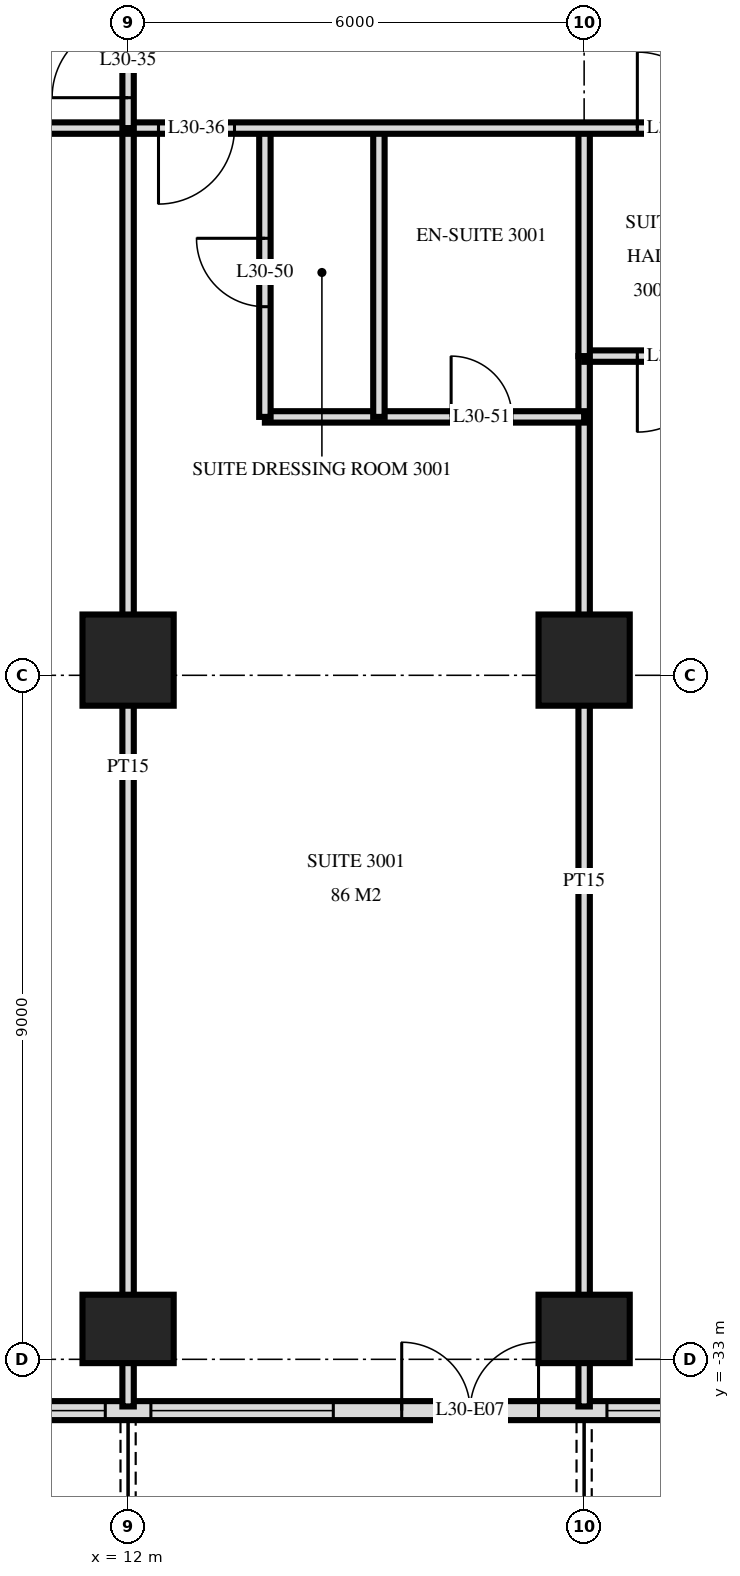
"""IFC4 building model, lengths in metres.
Left out: names, types, materials, properties, quantities, classifications, styles, units other than length and angle.
Written with IfcOpenShell. Run it as: python <this file> out.ifc"""

import sys

from ifc_helpers import new_model, si_unit, direction, frame, frame_2d, origin, origin_2d, place, context, subcontext, project, spatial, rectangle, extrude, element, fill, save


model = new_model("IFC4")
c1 = context("Model", 3, precision=1e-05, world=origin(), true_north=direction((0.0, 1.0)))
c2 = subcontext(c1, "Body", "Model", "MODEL_VIEW")
j1 = project(units=[si_unit("LENGTHUNIT", "METRE"), si_unit("PLANEANGLEUNIT", "RADIAN")], contexts=[c1])
p1 = place(None, origin())
s1 = spatial("IfcSite", under=j1, at=p1, CompositionType="ELEMENT")
p2 = place(p1, origin())
s2 = spatial("IfcBuilding", under=s1, at=p2, CompositionType="ELEMENT")
p3 = place(p2, frame((0.0, 0.0, 120.0)))
s3 = spatial("IfcBuildingStorey", under=s2, at=p3, CompositionType="ELEMENT", Elevation=120.0)
p4 = place(p3, frame((12.0, -32.6, 0.0), z_axis=(0.0, 0.0, 1.0), x_axis=(1.0, 0.0, 0.0)))
e1 = element("IfcColumn", 1, at=p4, inside=s3, PredefinedType="COLUMN", context=c2, shape_type="SweptSolid", body=[
    extrude(rectangle(XDim=1.2, YDim=0.9, at=origin_2d()), origin(), (0.0, 0.0, 1.0), 3.6),
])
p5 = place(p3, frame((12.0, -23.8, 0.0), z_axis=(0.0, 0.0, 1.0), x_axis=(1.0, 0.0, 0.0)))
e2 = element("IfcColumn", 2, at=p5, inside=s3, PredefinedType="COLUMN", context=c2, shape_type="SweptSolid", body=[
    extrude(rectangle(XDim=1.2, YDim=1.2, at=origin_2d()), origin(), (0.0, 0.0, 1.0), 3.6),
])
p6 = place(p3, frame((18.0, -32.6, 0.0), z_axis=(0.0, 0.0, 1.0), x_axis=(1.0, 0.0, 0.0)))
e3 = element("IfcColumn", 3, at=p6, inside=s3, PredefinedType="COLUMN", context=c2, shape_type="SweptSolid", body=[
    extrude(rectangle(XDim=1.2, YDim=0.9, at=origin_2d()), origin(), (0.0, 0.0, 1.0), 3.6),
])
p7 = place(p3, frame((18.0, -23.8, 0.0), z_axis=(0.0, 0.0, 1.0), x_axis=(1.0, 0.0, 0.0)))
e4 = element("IfcColumn", 4, at=p7, inside=s3, PredefinedType="COLUMN", context=c2, shape_type="SweptSolid", body=[
    extrude(rectangle(XDim=1.2, YDim=1.2, at=origin_2d()), origin(), (0.0, 0.0, 1.0), 3.6),
])
p8 = place(p3, frame((-23.675, -33.675, 0.0), z_axis=(0.0, 0.0, 1.0), x_axis=(1.0, 0.0, 0.0)))
e5 = element("IfcWall", 5, at=p8, inside=s3, PredefinedType="SOLIDWALL", context=c2, shape_type="SweptSolid", body=[
    extrude(rectangle(XDim=47.351, YDim=0.25, at=frame_2d((23.675, 0.0))), origin(), (0.0, 0.0, 1.0), 3.32),
])
p9 = place(p8, frame((0.275, 0.0, 0.3)))
e6 = element("IfcOpeningElement", 6, at=p9, cuts=e5, PredefinedType="OPENING", context=c2, shape_type="SweptSolid", body=[
    extrude(rectangle(XDim=2.4, YDim=2.1, at=frame_2d((1.2, 1.05))), frame((0.0, 0.135, 0.0), z_axis=(0.0, -1.0, 0.0), x_axis=(1.0, 0.0, 0.0)), (0.0, 0.0, 1.0), 0.27),
])
p10 = place(p8, frame((3.425, 0.0, 0.0)))
e7 = element("IfcOpeningElement", 7, at=p10, cuts=e5, PredefinedType="OPENING", context=c2, shape_type="SweptSolid", body=[
    extrude(rectangle(XDim=1.8, YDim=2.4, at=frame_2d((0.9, 1.2))), frame((0.0, 0.135, 0.0), z_axis=(0.0, -1.0, 0.0), x_axis=(1.0, 0.0, 0.0)), (0.0, 0.0, 1.0), 0.27),
])
p11 = place(p8, frame((7.775, 0.0, 0.0)))
e8 = element("IfcOpeningElement", 8, at=p11, cuts=e5, PredefinedType="OPENING", context=c2, shape_type="SweptSolid", body=[
    extrude(rectangle(XDim=1.8, YDim=2.4, at=frame_2d((0.9, 1.2))), frame((0.0, 0.135, 0.0), z_axis=(0.0, -1.0, 0.0), x_axis=(1.0, 0.0, 0.0)), (0.0, 0.0, 1.0), 0.27),
])
p12 = place(p8, frame((12.275, 0.0, 0.0)))
e9 = element("IfcOpeningElement", 9, at=p12, cuts=e5, PredefinedType="OPENING", context=c2, shape_type="SweptSolid", body=[
    extrude(rectangle(XDim=1.8, YDim=2.4, at=frame_2d((0.9, 1.2))), frame((0.0, 0.135, 0.0), z_axis=(0.0, -1.0, 0.0), x_axis=(1.0, 0.0, 0.0)), (0.0, 0.0, 1.0), 0.27),
])
p13 = place(p8, frame((14.975, 0.0, 0.3)))
e10 = element("IfcOpeningElement", 10, at=p13, cuts=e5, PredefinedType="OPENING", context=c2, shape_type="SweptSolid", body=[
    extrude(rectangle(XDim=2.4, YDim=2.1, at=frame_2d((1.2, 1.05))), frame((0.0, 0.135, 0.0), z_axis=(0.0, -1.0, 0.0), x_axis=(1.0, 0.0, 0.0)), (0.0, 0.0, 1.0), 0.27),
])
p14 = place(p8, frame((17.975, 0.0, 0.3)))
e11 = element("IfcOpeningElement", 11, at=p14, cuts=e5, PredefinedType="OPENING", context=c2, shape_type="SweptSolid", body=[
    extrude(rectangle(XDim=2.4, YDim=2.1, at=frame_2d((1.2, 1.05))), frame((0.0, 0.135, 0.0), z_axis=(0.0, -1.0, 0.0), x_axis=(1.0, 0.0, 0.0)), (0.0, 0.0, 1.0), 0.27),
])
p15 = place(p8, frame((21.275, 0.0, 0.0)))
e12 = element("IfcOpeningElement", 12, at=p15, cuts=e5, PredefinedType="OPENING", context=c2, shape_type="SweptSolid", body=[
    extrude(rectangle(XDim=1.8, YDim=2.4, at=frame_2d((0.9, 1.2))), frame((0.0, 0.135, 0.0), z_axis=(0.0, -1.0, 0.0), x_axis=(1.0, 0.0, 0.0)), (0.0, 0.0, 1.0), 0.27),
])
p16 = place(p8, frame((24.275, 0.0, 0.0)))
e13 = element("IfcOpeningElement", 13, at=p16, cuts=e5, PredefinedType="OPENING", context=c2, shape_type="SweptSolid", body=[
    extrude(rectangle(XDim=1.8, YDim=2.4, at=frame_2d((0.9, 1.2))), frame((0.0, 0.135, 0.0), z_axis=(0.0, -1.0, 0.0), x_axis=(1.0, 0.0, 0.0)), (0.0, 0.0, 1.0), 0.27),
])
p17 = place(p8, frame((26.975, 0.0, 0.3)))
e14 = element("IfcOpeningElement", 14, at=p17, cuts=e5, PredefinedType="OPENING", context=c2, shape_type="SweptSolid", body=[
    extrude(rectangle(XDim=2.4, YDim=2.1, at=frame_2d((1.2, 1.05))), frame((0.0, 0.135, 0.0), z_axis=(0.0, -1.0, 0.0), x_axis=(1.0, 0.0, 0.0)), (0.0, 0.0, 1.0), 0.27),
])
p18 = place(p8, frame((30.275, 0.0, 0.0)))
e15 = element("IfcOpeningElement", 15, at=p18, cuts=e5, PredefinedType="OPENING", context=c2, shape_type="SweptSolid", body=[
    extrude(rectangle(XDim=1.8, YDim=2.4, at=frame_2d((0.9, 1.2))), frame((0.0, 0.135, 0.0), z_axis=(0.0, -1.0, 0.0), x_axis=(1.0, 0.0, 0.0)), (0.0, 0.0, 1.0), 0.27),
])
p19 = place(p8, frame((32.975, 0.0, 0.3)))
e16 = element("IfcOpeningElement", 16, at=p19, cuts=e5, PredefinedType="OPENING", context=c2, shape_type="SweptSolid", body=[
    extrude(rectangle(XDim=2.4, YDim=2.1, at=frame_2d((1.2, 1.05))), frame((0.0, 0.135, 0.0), z_axis=(0.0, -1.0, 0.0), x_axis=(1.0, 0.0, 0.0)), (0.0, 0.0, 1.0), 0.27),
])
p20 = place(p8, frame((35.975, 0.0, 0.3)))
e17 = element("IfcOpeningElement", 17, at=p20, cuts=e5, PredefinedType="OPENING", context=c2, shape_type="SweptSolid", body=[
    extrude(rectangle(XDim=2.4, YDim=2.1, at=frame_2d((1.2, 1.05))), frame((0.0, 0.135, 0.0), z_axis=(0.0, -1.0, 0.0), x_axis=(1.0, 0.0, 0.0)), (0.0, 0.0, 1.0), 0.27),
])
p21 = place(p8, frame((39.275, 0.0, 0.0)))
e18 = element("IfcOpeningElement", 18, at=p21, cuts=e5, PredefinedType="OPENING", context=c2, shape_type="SweptSolid", body=[
    extrude(rectangle(XDim=1.8, YDim=2.4, at=frame_2d((0.9, 1.2))), frame((0.0, 0.135, 0.0), z_axis=(0.0, -1.0, 0.0), x_axis=(1.0, 0.0, 0.0)), (0.0, 0.0, 1.0), 0.27),
])
p22 = place(p8, frame((41.975, 0.0, 0.3)))
e19 = element("IfcOpeningElement", 19, at=p22, cuts=e5, PredefinedType="OPENING", context=c2, shape_type="SweptSolid", body=[
    extrude(rectangle(XDim=2.4, YDim=2.1, at=frame_2d((1.2, 1.05))), frame((0.0, 0.135, 0.0), z_axis=(0.0, -1.0, 0.0), x_axis=(1.0, 0.0, 0.0)), (0.0, 0.0, 1.0), 0.27),
])
p23 = place(p8, frame((45.125, 0.0, 0.0)))
e20 = element("IfcOpeningElement", 20, at=p23, cuts=e5, PredefinedType="OPENING", context=c2, shape_type="SweptSolid", body=[
    extrude(rectangle(XDim=1.8, YDim=2.4, at=frame_2d((0.9, 1.2))), frame((0.0, 0.135, 0.0), z_axis=(0.0, -1.0, 0.0), x_axis=(1.0, 0.0, 0.0)), (0.0, 0.0, 1.0), 0.27),
])
p24 = place(p3, frame((18.0, -19.8, 0.0), z_axis=(0.0, 0.0, 1.0), x_axis=(0.0, 1.0, 0.0)))
e21 = element("IfcWall", 21, at=p24, inside=s3, PredefinedType="PARTITIONING", context=c2, shape_type="SweptSolid", body=[
    extrude(rectangle(XDim=3.0, YDim=0.15, at=frame_2d((1.5, 0.0))), origin(), (0.0, 0.0, 1.0), 3.32),
])
p25 = place(p3, frame((18.0, -33.62, 0.0), z_axis=(0.0, 0.0, 1.0), x_axis=(0.0, 1.0, 0.0)))
e22 = element("IfcWall", 22, at=p25, inside=s3, PredefinedType="PARTITIONING", context=c2, shape_type="SweptSolid", body=[
    extrude(rectangle(XDim=13.82, YDim=0.15, at=frame_2d((6.91, 0.0))), origin(), (0.0, 0.0, 1.0), 3.32),
])
p26 = place(p3, frame((15.3, -20.6, 0.0), z_axis=(0.0, 0.0, 1.0), x_axis=(0.0, 1.0, 0.0)))
e23 = element("IfcWall", 23, at=p26, inside=s3, PredefinedType="PARTITIONING", context=c2, shape_type="SweptSolid", body=[
    extrude(rectangle(XDim=3.8, YDim=0.15, at=frame_2d((1.9, 0.0))), origin(), (0.0, 0.0, 1.0), 3.32),
])
p27 = place(p3, frame((13.8, -20.6, 0.0), z_axis=(0.0, 0.0, 1.0), x_axis=(0.0, 1.0, 0.0)))
e24 = element("IfcWall", 24, at=p27, inside=s3, PredefinedType="PARTITIONING", context=c2, shape_type="SweptSolid", body=[
    extrude(rectangle(XDim=3.8, YDim=0.15, at=frame_2d((1.9, 0.0))), origin(), (0.0, 0.0, 1.0), 3.32),
])
p28 = place(p27, frame((1.45, 0.0, 0.0)))
e25 = element("IfcOpeningElement", 25, at=p28, cuts=e24, PredefinedType="OPENING", context=c2, shape_type="SweptSolid", body=[
    extrude(rectangle(XDim=0.9, YDim=2.1, at=frame_2d((0.45, 1.05))), frame((0.0, 0.085, 0.0), z_axis=(0.0, -1.0, 0.0), x_axis=(1.0, 0.0, 0.0)), (0.0, 0.0, 1.0), 0.17),
])
p29 = place(p3, frame((12.0, -16.8, 0.0), z_axis=(0.0, 0.0, 1.0), x_axis=(0.0, 1.0, 0.0)))
e26 = element("IfcWall", 26, at=p29, inside=s3, PredefinedType="PARTITIONING", context=c2, shape_type="SweptSolid", body=[
    extrude(rectangle(XDim=1.75, YDim=0.15, at=frame_2d((0.875, 0.0))), origin(), (0.0, 0.0, 1.0), 3.32),
])
p30 = place(p29, frame((0.4, 0.0, 0.0)))
e27 = element("IfcOpeningElement", 27, at=p30, cuts=e26, PredefinedType="OPENING", context=c2, shape_type="SweptSolid", body=[
    extrude(rectangle(XDim=1.0, YDim=2.1, at=frame_2d((0.5, 1.05))), frame((0.0, 0.085, 0.0), z_axis=(0.0, -1.0, 0.0), x_axis=(1.0, 0.0, 0.0)), (0.0, 0.0, 1.0), 0.17),
])
p31 = place(p3, frame((12.0, -33.62, 0.0), z_axis=(0.0, 0.0, 1.0), x_axis=(0.0, 1.0, 0.0)))
e28 = element("IfcWall", 28, at=p31, inside=s3, PredefinedType="PARTITIONING", context=c2, shape_type="SweptSolid", body=[
    extrude(rectangle(XDim=16.82, YDim=0.15, at=frame_2d((8.41, 0.0))), origin(), (0.0, 0.0, 1.0), 3.32),
])
p32 = place(p3, frame((13.8, -20.6, 0.0), z_axis=(0.0, 0.0, 1.0), x_axis=(1.0, 0.0, 0.0)))
e29 = element("IfcWall", 29, at=p32, inside=s3, PredefinedType="PARTITIONING", context=c2, shape_type="SweptSolid", body=[
    extrude(rectangle(XDim=4.2, YDim=0.15, at=frame_2d((2.1, 0.0))), origin(), (0.0, 0.0, 1.0), 3.32),
])
p33 = place(p32, frame((2.45, 0.0, 0.0)))
e30 = element("IfcOpeningElement", 30, at=p33, cuts=e29, PredefinedType="OPENING", context=c2, shape_type="SweptSolid", body=[
    extrude(rectangle(XDim=0.8, YDim=2.1, at=frame_2d((0.4, 1.05))), frame((0.0, 0.085, 0.0), z_axis=(0.0, -1.0, 0.0), x_axis=(1.0, 0.0, 0.0)), (0.0, 0.0, 1.0), 0.17),
])
p34 = place(p3, frame((18.0, -19.8, 0.0), z_axis=(0.0, 0.0, 1.0), x_axis=(1.0, 0.0, 0.0)))
e31 = element("IfcWall", 31, at=p34, inside=s3, PredefinedType="PARTITIONING", context=c2, shape_type="SweptSolid", body=[
    extrude(rectangle(XDim=2.4, YDim=0.15, at=frame_2d((1.2, 0.0))), origin(), (0.0, 0.0, 1.0), 3.32),
])
p35 = place(p34, frame((0.7, 0.0, 0.0)))
e32 = element("IfcOpeningElement", 32, at=p35, cuts=e31, PredefinedType="OPENING", context=c2, shape_type="SweptSolid", body=[
    extrude(rectangle(XDim=1.0, YDim=2.1, at=frame_2d((0.5, 1.05))), frame((0.0, 0.085, 0.0), z_axis=(0.0, -1.0, 0.0), x_axis=(1.0, 0.0, 0.0)), (0.0, 0.0, 1.0), 0.17),
])
p36 = place(p3, frame((-28.02, -16.8, 0.0), z_axis=(0.0, 0.0, 1.0), x_axis=(1.0, 0.0, 0.0)))
e33 = element("IfcWall", 33, at=p36, inside=s3, PredefinedType="PARTITIONING", context=c2, shape_type="SweptSolid", body=[
    extrude(rectangle(XDim=56.04, YDim=0.15, at=frame_2d((28.02, 0.0))), origin(), (0.0, 0.0, 1.0), 3.32),
])
p37 = place(p36, frame((12.52, 0.0, 0.0)))
e34 = element("IfcOpeningElement", 34, at=p37, cuts=e33, PredefinedType="OPENING", context=c2, shape_type="SweptSolid", body=[
    extrude(rectangle(XDim=1.0, YDim=2.1, at=frame_2d((0.5, 1.05))), frame((0.0, 0.085, 0.0), z_axis=(0.0, -1.0, 0.0), x_axis=(1.0, 0.0, 0.0)), (0.0, 0.0, 1.0), 0.17),
])
p38 = place(p36, frame((8.32, 0.0, 0.0)))
e35 = element("IfcOpeningElement", 35, at=p38, cuts=e33, PredefinedType="OPENING", context=c2, shape_type="SweptSolid", body=[
    extrude(rectangle(XDim=1.0, YDim=2.1, at=frame_2d((0.5, 1.05))), frame((0.0, 0.085, 0.0), z_axis=(0.0, -1.0, 0.0), x_axis=(1.0, 0.0, 0.0)), (0.0, 0.0, 1.0), 0.17),
])
p39 = place(p36, frame((40.42, 0.0, 0.0)))
e36 = element("IfcOpeningElement", 36, at=p39, cuts=e33, PredefinedType="OPENING", context=c2, shape_type="SweptSolid", body=[
    extrude(rectangle(XDim=1.0, YDim=2.1, at=frame_2d((0.5, 1.05))), frame((0.0, 0.085, 0.0), z_axis=(0.0, -1.0, 0.0), x_axis=(1.0, 0.0, 0.0)), (0.0, 0.0, 1.0), 0.17),
])
p40 = place(p36, frame((46.72, 0.0, 0.0)))
e37 = element("IfcOpeningElement", 37, at=p40, cuts=e33, PredefinedType="OPENING", context=c2, shape_type="SweptSolid", body=[
    extrude(rectangle(XDim=1.0, YDim=2.1, at=frame_2d((0.5, 1.05))), frame((0.0, 0.085, 0.0), z_axis=(0.0, -1.0, 0.0), x_axis=(1.0, 0.0, 0.0)), (0.0, 0.0, 1.0), 0.17),
])
p41 = place(p36, frame((21.52, 0.0, 0.0)))
e38 = element("IfcOpeningElement", 38, at=p41, cuts=e33, PredefinedType="OPENING", context=c2, shape_type="SweptSolid", body=[
    extrude(rectangle(XDim=1.0, YDim=2.1, at=frame_2d((0.5, 1.05))), frame((0.0, 0.085, 0.0), z_axis=(0.0, -1.0, 0.0), x_axis=(1.0, 0.0, 0.0)), (0.0, 0.0, 1.0), 0.17),
])
p42 = place(p36, frame((30.52, 0.0, 0.0)))
e39 = element("IfcOpeningElement", 39, at=p42, cuts=e33, PredefinedType="OPENING", context=c2, shape_type="SweptSolid", body=[
    extrude(rectangle(XDim=1.0, YDim=2.1, at=frame_2d((0.5, 1.05))), frame((0.0, 0.085, 0.0), z_axis=(0.0, -1.0, 0.0), x_axis=(1.0, 0.0, 0.0)), (0.0, 0.0, 1.0), 0.17),
])
p43 = place(p36, frame((36.52, 0.0, 0.0)))
e40 = element("IfcOpeningElement", 40, at=p43, cuts=e33, PredefinedType="OPENING", context=c2, shape_type="SweptSolid", body=[
    extrude(rectangle(XDim=1.0, YDim=2.1, at=frame_2d((0.5, 1.05))), frame((0.0, 0.085, 0.0), z_axis=(0.0, -1.0, 0.0), x_axis=(1.0, 0.0, 0.0)), (0.0, 0.0, 1.0), 0.17),
])
p44 = place(p19, origin())
e41 = element("IfcWindow", 41, at=p44, inside=s3, PartitioningType="SINGLE_PANEL", PredefinedType="WINDOW", context=c2, shape_type="SweptSolid", body=[
    extrude(rectangle(XDim=2.4, YDim=2.1, at=frame_2d((1.2, 1.05))), frame((0.0, 0.03, 0.0), z_axis=(0.0, -1.0, 0.0), x_axis=(1.0, 0.0, 0.0)), (0.0, 0.0, 1.0), 0.06),
])
fill(e16, e41)
p45 = place(p20, origin())
e42 = element("IfcWindow", 42, at=p45, inside=s3, PartitioningType="SINGLE_PANEL", PredefinedType="WINDOW", context=c2, shape_type="SweptSolid", body=[
    extrude(rectangle(XDim=2.4, YDim=2.1, at=frame_2d((1.2, 1.05))), frame((0.0, 0.03, 0.0), z_axis=(0.0, -1.0, 0.0), x_axis=(1.0, 0.0, 0.0)), (0.0, 0.0, 1.0), 0.06),
])
fill(e17, e42)
p46 = place(p21, origin())
e43 = element("IfcDoor", 43, at=p46, inside=s3, OperationType="DOUBLE_DOOR_SINGLE_SWING", PredefinedType="DOOR", context=c2, shape_type="SweptSolid", body=[
    extrude(rectangle(XDim=1.8, YDim=2.4, at=frame_2d((0.9, 1.2))), frame((0.0, 0.025, 0.0), z_axis=(0.0, -1.0, 0.0), x_axis=(1.0, 0.0, 0.0)), (0.0, 0.0, 1.0), 0.05),
])
fill(e18, e43)
p47 = place(p22, origin())
e44 = element("IfcWindow", 44, at=p47, inside=s3, PartitioningType="SINGLE_PANEL", PredefinedType="WINDOW", context=c2, shape_type="SweptSolid", body=[
    extrude(rectangle(XDim=2.4, YDim=2.1, at=frame_2d((1.2, 1.05))), frame((0.0, 0.03, 0.0), z_axis=(0.0, -1.0, 0.0), x_axis=(1.0, 0.0, 0.0)), (0.0, 0.0, 1.0), 0.06),
])
fill(e19, e44)
p48 = place(p30, origin())
e45 = element("IfcDoor", 45, at=p48, inside=s3, OperationType="SINGLE_SWING_RIGHT", PredefinedType="DOOR", context=c2, shape_type="SweptSolid", body=[
    extrude(rectangle(XDim=1.0, YDim=2.1, at=frame_2d((0.5, 1.05))), frame((0.0, 0.025, 0.0), z_axis=(0.0, -1.0, 0.0), x_axis=(1.0, 0.0, 0.0)), (0.0, 0.0, 1.0), 0.05),
])
fill(e27, e45)
p49 = place(p39, frame((0.5, 0.0, 0.0), z_axis=(0.0, 0.0, 1.0), x_axis=(-1.0, 0.0, 0.0)))
e46 = element("IfcDoor", 46, at=p49, inside=s3, OperationType="SINGLE_SWING_LEFT", PredefinedType="DOOR", context=c2, shape_type="SweptSolid", body=[
    extrude(rectangle(XDim=1.0, YDim=2.1, at=frame_2d((0.0, 1.05))), frame((0.0, -0.025, 0.0), z_axis=(0.0, 1.0, 0.0), x_axis=(-1.0, 0.0, 0.0)), (0.0, 0.0, 1.0), 0.05),
])
fill(e36, e46)
p50 = place(p40, origin())
e47 = element("IfcDoor", 47, at=p50, inside=s3, OperationType="SINGLE_SWING_RIGHT", PredefinedType="DOOR", context=c2, shape_type="SweptSolid", body=[
    extrude(rectangle(XDim=1.0, YDim=2.1, at=frame_2d((0.5, 1.05))), frame((0.0, 0.025, 0.0), z_axis=(0.0, -1.0, 0.0), x_axis=(1.0, 0.0, 0.0)), (0.0, 0.0, 1.0), 0.05),
])
fill(e37, e47)
p51 = place(p28, origin())
e48 = element("IfcDoor", 48, at=p51, inside=s3, OperationType="SINGLE_SWING_LEFT", PredefinedType="DOOR", context=c2, shape_type="SweptSolid", body=[
    extrude(rectangle(XDim=0.9, YDim=2.1, at=frame_2d((0.45, 1.05))), frame((0.0, 0.025, 0.0), z_axis=(0.0, -1.0, 0.0), x_axis=(1.0, 0.0, 0.0)), (0.0, 0.0, 1.0), 0.05),
])
fill(e25, e48)
p52 = place(p33, origin())
e49 = element("IfcDoor", 49, at=p52, inside=s3, OperationType="SINGLE_SWING_RIGHT", PredefinedType="DOOR", context=c2, shape_type="SweptSolid", body=[
    extrude(rectangle(XDim=0.8, YDim=2.1, at=frame_2d((0.4, 1.05))), frame((0.0, 0.025, 0.0), z_axis=(0.0, -1.0, 0.0), x_axis=(1.0, 0.0, 0.0)), (0.0, 0.0, 1.0), 0.05),
])
fill(e30, e49)
p53 = place(p35, frame((0.5, 0.0, 0.0), z_axis=(0.0, 0.0, 1.0), x_axis=(-1.0, 0.0, 0.0)))
e50 = element("IfcDoor", 50, at=p53, inside=s3, OperationType="SINGLE_SWING_LEFT", PredefinedType="DOOR", context=c2, shape_type="SweptSolid", body=[
    extrude(rectangle(XDim=1.0, YDim=2.1, at=frame_2d((0.0, 1.05))), frame((0.0, -0.025, 0.0), z_axis=(0.0, 1.0, 0.0), x_axis=(-1.0, 0.0, 0.0)), (0.0, 0.0, 1.0), 0.05),
])
fill(e32, e50)
save(model, sys.argv[1])
